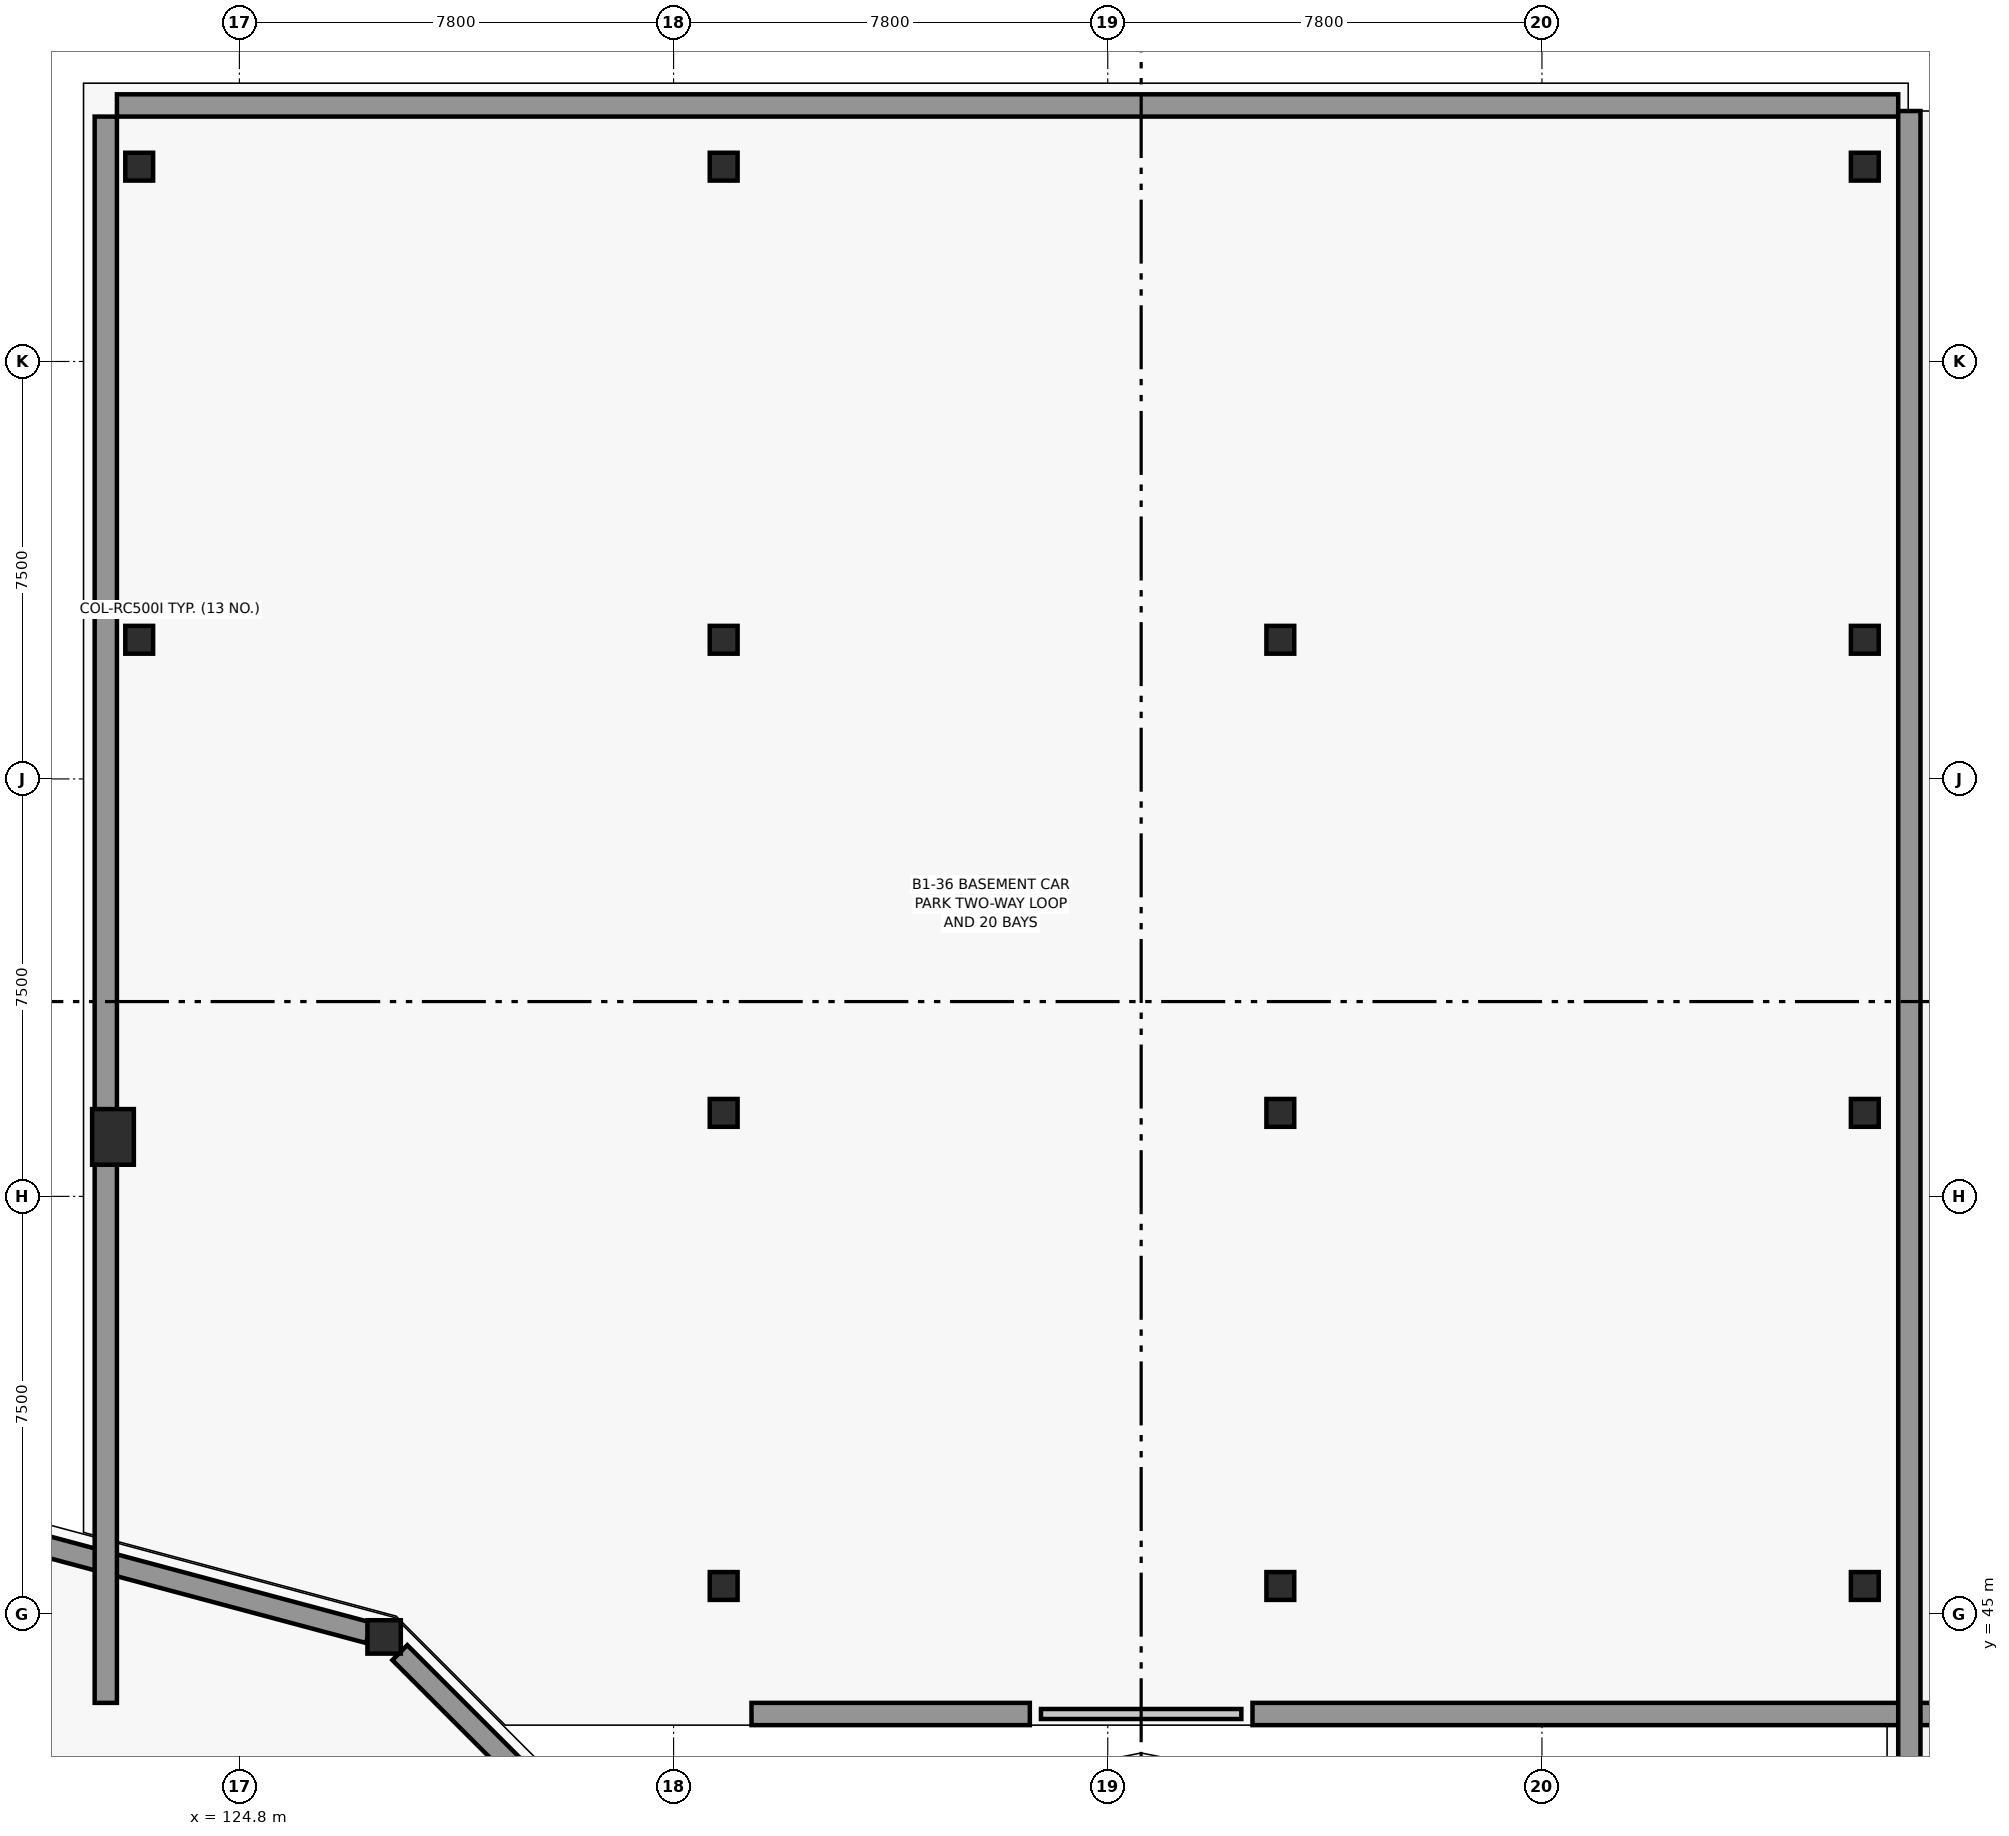
"""IFC4 building model, lengths in metres.
Left out: names, types, materials, properties, quantities, classifications, styles, units other than length and angle.
Written with IfcOpenShell. Run it as: python <this file> out.ifc"""

import sys

from ifc_helpers import new_model, si_unit, direction, frame, frame_2d, origin, origin_2d, place, context, subcontext, project, spatial, rectangle, extrude, element, save


model = new_model("IFC4")
c1 = context("Model", 3, precision=1e-05, world=origin(), true_north=direction((0.0, 1.0)))
c2 = subcontext(c1, "Body", "Model", "MODEL_VIEW")
j1 = project(units=[si_unit("LENGTHUNIT", "METRE"), si_unit("PLANEANGLEUNIT", "RADIAN")], contexts=[c1])
p1 = place(None, origin())
s1 = spatial("IfcSite", under=j1, at=p1, CompositionType="ELEMENT")
p2 = place(p1, origin())
s2 = spatial("IfcBuilding", under=s1, at=p2, CompositionType="ELEMENT")
p3 = place(p2, frame((0.0, 0.0, -4.2)))
s3 = spatial("IfcBuildingStorey", under=s2, at=p3, CompositionType="ELEMENT", Elevation=-4.2)
p4 = place(p3, frame((122.529, 53.568, 0.0), z_axis=(0.0, 0.0, 1.0), x_axis=(1.0, 0.0, 0.0)))
e1 = element("IfcColumn", 1, at=p4, inside=s3, PredefinedType="COLUMN", context=c2, shape_type="SweptSolid", body=[
    extrude(rectangle(XDim=0.75, YDim=1.0, at=origin_2d()), origin(), (0.0, 0.0, 1.0), 4.2),
])
for number, where, z_axis, x_axis in (
    (2, (123.0, 62.5, 0.0), (0.0, 0.0, 1.0), (1.0, 0.0, 0.0)),
    (3, (123.0, 71.0, 0.0), (0.0, 0.0, 1.0), (1.0, 0.0, 0.0)),
    (4, (133.5, 45.5, 0.0), (0.0, 0.0, 1.0), (1.0, 0.0, 0.0)),
    (5, (133.5, 54.0, 0.0), (0.0, 0.0, 1.0), (1.0, 0.0, 0.0)),
    (6, (133.5, 62.5, 0.0), (0.0, 0.0, 1.0), (1.0, 0.0, 0.0)),
    (7, (133.5, 71.0, 0.0), (0.0, 0.0, 1.0), (1.0, 0.0, 0.0)),
    (8, (143.5, 45.5, 0.0), (0.0, 0.0, 1.0), (1.0, 0.0, 0.0)),
    (9, (143.5, 54.0, 0.0), (0.0, 0.0, 1.0), (1.0, 0.0, 0.0)),
    (10, (143.5, 62.5, 0.0), (0.0, 0.0, 1.0), (1.0, 0.0, 0.0)),
    (11, (154.0, 45.5, 0.0), (0.0, 0.0, 1.0), (1.0, 0.0, 0.0)),
    (12, (154.0, 54.0, 0.0), (0.0, 0.0, 1.0), (1.0, 0.0, 0.0)),
    (13, (154.0, 62.5, 0.0), (0.0, 0.0, 1.0), (1.0, 0.0, 0.0)),
    (14, (154.0, 71.0, 0.0), (0.0, 0.0, 1.0), (1.0, 0.0, 0.0)),
):
    element("IfcColumn", number, at=place(p3, frame(where, z_axis=z_axis, x_axis=x_axis)), inside=s3, PredefinedType="COLUMN", context=c2, shape_type="SweptSolid", body=[
        extrude(rectangle(XDim=0.5, YDim=0.5, at=origin_2d()), origin(), (0.0, 0.0, 1.0), 4.2),
    ])
p5 = place(p3, frame((127.4, 44.585, 0.0), z_axis=(0.0, 0.0, 1.0), x_axis=(1.0, 0.0, 0.0)))
e15 = element("IfcColumn", 15, at=p5, inside=s3, PredefinedType="COLUMN", context=c2, shape_type="SweptSolid", body=[
    extrude(rectangle(XDim=0.6, YDim=0.6, at=origin_2d()), origin(), (0.0, 0.0, 1.0), 4.2),
])
p6 = place(p3, frame((127.682, 44.303, 0.0), z_axis=(0.0, 0.0, 1.0), x_axis=(0.707106781187, -0.707106781187, 0.0)))
e16 = element("IfcWall", 16, at=p6, inside=s3, PredefinedType="SHEAR", context=c2, shape_type="SweptSolid", body=[
    extrude(rectangle(XDim=6.227, YDim=0.38, at=frame_2d((3.113, 0.0))), origin(), (0.0, 0.0, 1.0), 3.92),
])
p7 = place(p3, frame((121.276, 46.226, 0.0), z_axis=(0.0, 0.0, 1.0), x_axis=(0.965920331482, -0.258839551131, 0.0)))
e17 = element("IfcWall", 17, at=p7, inside=s3, PredefinedType="SHEAR", context=c2, shape_type="SweptSolid", body=[
    extrude(rectangle(XDim=6.054, YDim=0.38, at=frame_2d((3.027, 0.0))), origin(), (0.0, 0.0, 1.0), 3.92),
])
p8 = place(p3, frame((122.4, 43.4, 0.0), z_axis=(0.0, 0.0, 1.0), x_axis=(0.0, 1.0, 0.0)))
e18 = element("IfcWall", 18, at=p8, inside=s3, PredefinedType="SHEAR", context=c2, shape_type="SweptSolid", body=[
    extrude(rectangle(XDim=28.5, YDim=0.4, at=frame_2d((14.25, 0.0))), origin(), (0.0, 0.0, 1.0), 3.86),
])
p9 = place(p3, frame((122.6, 72.1, 0.0), z_axis=(0.0, 0.0, 1.0), x_axis=(1.0, 0.0, 0.0)))
e19 = element("IfcWall", 19, at=p9, inside=s3, PredefinedType="SHEAR", context=c2, shape_type="SweptSolid", body=[
    extrude(rectangle(XDim=32.0, YDim=0.4, at=frame_2d((16.0, 0.0))), origin(), (0.0, 0.0, 1.0), 3.86),
])
p10 = place(p3, frame((134.0, 43.2, 0.0), z_axis=(0.0, 0.0, 1.0), x_axis=(1.0, 0.0, 0.0)))
e20 = element("IfcWall", 20, at=p10, inside=s3, PredefinedType="SHEAR", context=c2, shape_type="SweptSolid", body=[
    extrude(rectangle(XDim=5.0, YDim=0.4, at=frame_2d((2.5, 0.0))), origin(), (0.0, 0.0, 1.0), 3.86),
])
p11 = place(p3, frame((143.0, 43.2, 0.0), z_axis=(0.0, 0.0, 1.0), x_axis=(1.0, 0.0, 0.0)))
e21 = element("IfcWall", 21, at=p11, inside=s3, PredefinedType="SHEAR", context=c2, shape_type="SweptSolid", body=[
    extrude(rectangle(XDim=17.35, YDim=0.4, at=frame_2d((8.675, 0.0))), origin(), (0.0, 0.0, 1.0), 3.86),
])
p12 = place(p3, frame((154.8, 38.4, 0.0), z_axis=(0.0, 0.0, 1.0), x_axis=(0.0, 1.0, 0.0)))
e22 = element("IfcWall", 22, at=p12, inside=s3, PredefinedType="SHEAR", context=c2, shape_type="SweptSolid", body=[
    extrude(rectangle(XDim=33.6, YDim=0.4, at=frame_2d((16.8, 0.0))), origin(), (0.0, 0.0, 1.0), 3.86),
])
p13 = place(p3, frame((139.2, 43.2, 0.0), z_axis=(0.0, 0.0, 1.0), x_axis=(1.0, 0.0, 0.0)))
e23 = element("IfcWall", 23, at=p13, inside=s3, PredefinedType="PARTITIONING", context=c2, shape_type="SweptSolid", body=[
    extrude(rectangle(XDim=3.6, YDim=0.18, at=frame_2d((1.8, 0.0))), origin(), (0.0, 0.0, 1.0), 3.915),
])
save(model, sys.argv[1])
